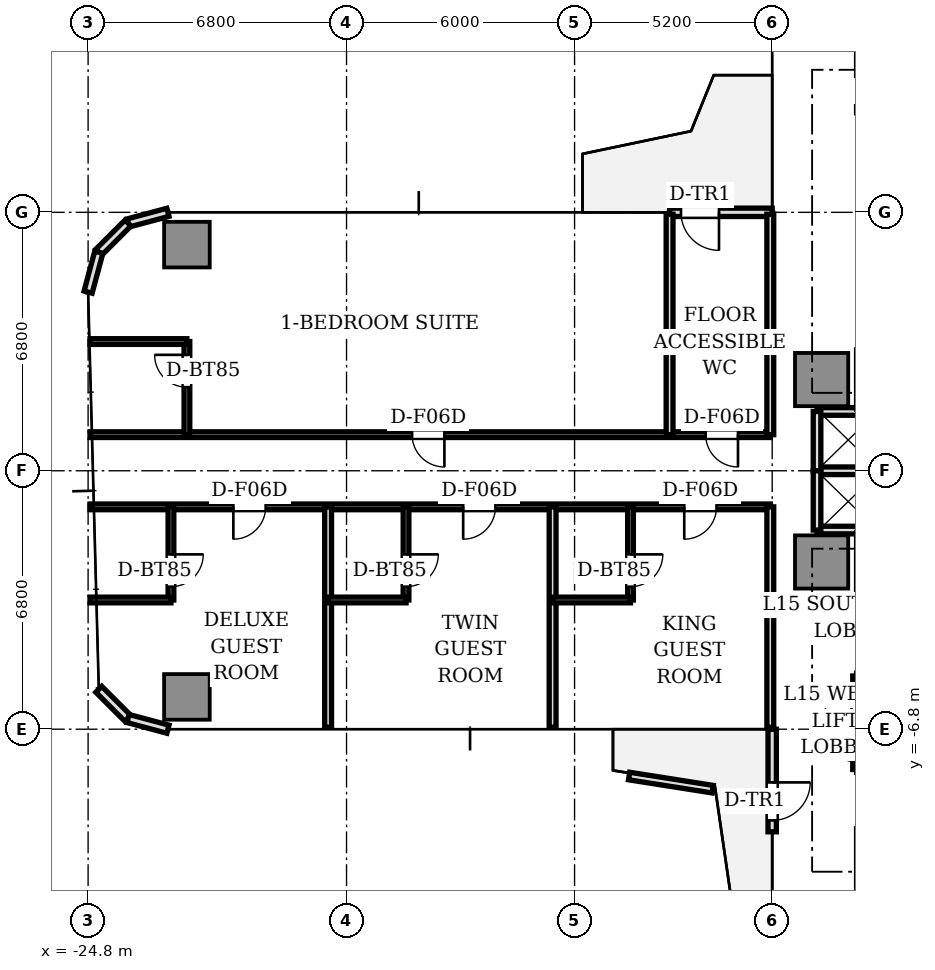
"""IFC4 building model, lengths in metres.
Left out: names, types, materials, properties, quantities, classifications, styles, units other than length and angle.
Written with IfcOpenShell. Run it as: python <this file> out.ifc"""

import sys

from ifc_helpers import new_model, si_unit, direction, frame, frame_2d, origin, origin_2d, place, context, subcontext, project, spatial, rectangle, extrude, source, transform, mapped, element, fill, save


model = new_model("IFC4")
c1 = context("Model", 3, precision=1e-05, world=origin(), true_north=direction((0.0, 1.0)))
c2 = subcontext(c1, "Body", "Model", "MODEL_VIEW")
j1 = project(units=[si_unit("LENGTHUNIT", "METRE"), si_unit("PLANEANGLEUNIT", "RADIAN")], contexts=[c1])
p1 = place(None, origin())
s1 = spatial("IfcSite", under=j1, at=p1, CompositionType="ELEMENT")
p2 = place(p1, origin())
s2 = spatial("IfcBuilding", under=s1, at=p2, CompositionType="ELEMENT")
p3 = place(p2, frame((0.0, 0.0, 57.75)))
s3 = spatial("IfcBuildingStorey", under=s2, at=p3, CompositionType="ELEMENT", Elevation=57.75)
m1 = source(origin(), c2, "Body", "SweptSolid", [
    extrude(rectangle(XDim=1.4, YDim=1.4, at=origin_2d()), origin(), (0.0, 0.0, 1.0), 3.11),
])
for number, where, z_axis, x_axis in (
    (1, (-5.5, 2.4, 0.0), (0.0, 0.0, 1.0), (1.0, 0.0, 0.0)),
    (2, (-5.5, -2.4, 0.0), (0.0, 0.0, 1.0), (1.0, 0.0, 0.0)),
):
    element("IfcColumn", number, at=place(p3, frame(where, z_axis=z_axis, x_axis=x_axis)), inside=s3, PredefinedType="COLUMN", context=c2, shape_type="MappedRepresentation", body=[
        mapped(m1, transform((0.0, 0.0, 0.0), scale=1.0)),
    ])
m2 = source(origin(), c2, "Body", "SweptSolid", [
    extrude(rectangle(XDim=1.2, YDim=1.2, at=origin_2d()), origin(), (0.0, 0.0, 1.0), 3.11),
])
for number, where, z_axis, x_axis in (
    (3, (-22.2, 5.95, 0.0), (0.0, 0.0, 1.0), (1.0, 0.0, 0.0)),
    (4, (-22.2, -5.95, 0.0), (0.0, 0.0, 1.0), (1.0, 0.0, 0.0)),
):
    element("IfcColumn", number, at=place(p3, frame(where, z_axis=z_axis, x_axis=x_axis)), inside=s3, PredefinedType="COLUMN", context=c2, shape_type="MappedRepresentation", body=[
        mapped(m2, transform((0.0, 0.0, 0.0), scale=1.0)),
    ])
p4 = place(p3, frame((-6.8, 6.8, 0.0), z_axis=(0.0, 0.0, 1.0), x_axis=(-1.0, 0.0, 0.0)))
e5 = element("IfcWall", 5, at=p4, inside=s3, PredefinedType="STANDARD", context=c2, shape_type="SweptSolid", body=[
    extrude(rectangle(XDim=2.7, YDim=0.22, at=frame_2d((1.35, 0.0))), origin(), (0.0, 0.0, 1.0), 3.11),
])
p5 = place(p4, frame((1.4, 0.0, 0.0)))
e6 = element("IfcOpeningElement", 6, at=p5, cuts=e5, PredefinedType="OPENING", context=c2, shape_type="SweptSolid", body=[
    extrude(rectangle(XDim=1.0, YDim=2.2, at=frame_2d((0.5, 1.1))), frame((0.0, 0.12, 0.0), z_axis=(0.0, -1.0, 0.0), x_axis=(1.0, 0.0, 0.0)), (0.0, 0.0, 1.0), 0.24),
])
for number, where, z_axis, x_axis in (
    (7, (-22.7, 6.8, 0.0), (0.0, 0.0, 1.0), (-0.966, -0.259, 0.0)),
    (8, (-23.75, 6.519, 0.0), (0.0, 0.0, 1.0), (-0.707, -0.707, 0.0)),
    (9, (-24.519, 5.75, 0.0), (0.0, 0.0, 1.0), (-0.259, -0.966, 0.0)),
    (10, (-24.519, -5.75, 0.0), (0.0, 0.0, 1.0), (0.707, -0.707, 0.0)),
    (11, (-23.75, -6.519, 0.0), (0.0, 0.0, 1.0), (0.966, -0.259, 0.0)),
):
    element("IfcWall", number, at=place(p3, frame(where, z_axis=z_axis, x_axis=x_axis)), inside=s3, PredefinedType="STANDARD", context=c2, shape_type="SweptSolid", body=[
        extrude(rectangle(XDim=1.087, YDim=0.22, at=frame_2d((0.543, 0.0))), origin(), (0.0, 0.0, 1.0), 3.11),
    ])
p6 = place(p3, frame((-6.8, -6.8, 0.0), z_axis=(0.0, 0.0, 1.0), x_axis=(0.0, -1.0, 0.0)))
e12 = element("IfcWall", 12, at=p6, inside=s3, PredefinedType="STANDARD", context=c2, shape_type="SweptSolid", body=[
    extrude(rectangle(XDim=2.7, YDim=0.22, at=frame_2d((1.35, 0.0))), origin(), (0.0, 0.0, 1.0), 3.11),
])
p7 = place(p6, frame((1.4, 0.0, 0.0)))
e13 = element("IfcOpeningElement", 13, at=p7, cuts=e12, PredefinedType="OPENING", context=c2, shape_type="SweptSolid", body=[
    extrude(rectangle(XDim=1.0, YDim=2.2, at=frame_2d((0.5, 1.1))), frame((0.0, 0.12, 0.0), z_axis=(0.0, -1.0, 0.0), x_axis=(1.0, 0.0, 0.0)), (0.0, 0.0, 1.0), 0.24),
])
p8 = place(p3, frame((-10.565, -8.032, 0.0), z_axis=(0.0, 0.0, 1.0), x_axis=(0.987843719012, -0.155450271175, 0.0)))
e14 = element("IfcWall", 14, at=p8, inside=s3, PredefinedType="PARAPET", context=c2, shape_type="SweptSolid", body=[
    extrude(rectangle(XDim=2.227, YDim=0.2, at=frame_2d((1.114, 0.0))), origin(), (0.0, 0.0, 1.0), 0.65),
])
for number, where, z_axis, x_axis in (
    (15, (-5.62, 1.56, 0.0), (0.0, 0.0, 1.0), (1.0, 0.0, 0.0)),
    (16, (-5.62, -1.56, 0.0), (0.0, 0.0, 1.0), (1.0, 0.0, 0.0)),
    (17, (-5.62, 0.0, 0.0), (0.0, 0.0, 1.0), (1.0, 0.0, 0.0)),
):
    element("IfcWall", number, at=place(p3, frame(where, z_axis=z_axis, x_axis=x_axis)), inside=s3, PredefinedType="SOLIDWALL", context=c2, shape_type="SweptSolid", body=[
        extrude(rectangle(XDim=1.64, YDim=0.2, at=frame_2d((0.82, 0.0))), origin(), (0.0, 0.0, 1.0), 2.66),
    ])
for number, where, z_axis, x_axis in (
    (18, (-5.62, 0.0, 0.0), (0.0, 0.0, 1.0), (0.0, 1.0, 0.0)),
    (19, (-5.62, -1.56, 0.0), (0.0, 0.0, 1.0), (0.0, 1.0, 0.0)),
):
    element("IfcWall", number, at=place(p3, frame(where, z_axis=z_axis, x_axis=x_axis)), inside=s3, PredefinedType="SOLIDWALL", context=c2, shape_type="SweptSolid", body=[
        extrude(rectangle(XDim=1.56, YDim=0.2, at=frame_2d((0.78, 0.0))), origin(), (0.0, 0.0, 1.0), 2.66),
    ])
p9 = place(p3, frame((-4.58, -7.86, 0.0), z_axis=(0.0, 0.0, 1.0), x_axis=(0.0, 1.0, 0.0)))
e20 = element("IfcWall", 20, at=p9, inside=s3, PredefinedType="SOLIDWALL", context=c2, shape_type="SweptSolid", body=[
    extrude(rectangle(XDim=2.46, YDim=0.2, at=frame_2d((1.23, 0.0))), origin(), (0.0, 0.0, 1.0), 2.66),
])
p10 = place(p9, frame((0.2, 0.0, 0.0)))
e21 = element("IfcOpeningElement", 21, at=p10, cuts=e20, PredefinedType="OPENING", context=c2, shape_type="SweptSolid", body=[
    extrude(rectangle(XDim=0.85, YDim=2.1, at=frame_2d((0.425, 1.05))), frame((0.0, 0.11, 0.0), z_axis=(0.0, -1.0, 0.0), x_axis=(1.0, 0.0, 0.0)), (0.0, 0.0, 1.0), 0.22),
])
p11 = place(p9, frame((1.38, 0.0, 0.0)))
e22 = element("IfcOpeningElement", 22, at=p11, cuts=e20, PredefinedType="OPENING", context=c2, shape_type="SweptSolid", body=[
    extrude(rectangle(XDim=0.85, YDim=2.1, at=frame_2d((0.425, 1.05))), frame((0.0, 0.11, 0.0), z_axis=(0.0, -1.0, 0.0), x_axis=(1.0, 0.0, 0.0)), (0.0, 0.0, 1.0), 0.22),
])
p12 = place(p3, frame((-6.85, -0.95, 0.0), z_axis=(0.0, 0.0, 1.0), x_axis=(-1.0, 0.0, 0.0)))
e23 = element("IfcWall", 23, at=p12, inside=s3, PredefinedType="PARTITIONING", context=c2, shape_type="SweptSolid", body=[
    extrude(rectangle(XDim=17.9, YDim=0.15, at=frame_2d((8.95, 0.0))), origin(), (0.0, 0.0, 1.0), 2.66),
])
p13 = place(p12, frame((1.414, 0.0, 0.0)))
e24 = element("IfcOpeningElement", 24, at=p13, cuts=e23, PredefinedType="OPENING", context=c2, shape_type="SweptSolid", body=[
    extrude(rectangle(XDim=0.85, YDim=2.1, at=frame_2d((0.425, 1.05))), frame((0.0, 0.085, 0.0), z_axis=(0.0, -1.0, 0.0), x_axis=(1.0, 0.0, 0.0)), (0.0, 0.0, 1.0), 0.17),
])
p14 = place(p12, frame((7.231, 0.0, 0.0)))
e25 = element("IfcOpeningElement", 25, at=p14, cuts=e23, PredefinedType="OPENING", context=c2, shape_type="SweptSolid", body=[
    extrude(rectangle(XDim=0.85, YDim=2.1, at=frame_2d((0.425, 1.05))), frame((0.0, 0.085, 0.0), z_axis=(0.0, -1.0, 0.0), x_axis=(1.0, 0.0, 0.0)), (0.0, 0.0, 1.0), 0.17),
])
p15 = place(p12, frame((13.278, 0.0, 0.0)))
e26 = element("IfcOpeningElement", 26, at=p15, cuts=e23, PredefinedType="OPENING", context=c2, shape_type="SweptSolid", body=[
    extrude(rectangle(XDim=0.85, YDim=2.1, at=frame_2d((0.425, 1.05))), frame((0.0, 0.085, 0.0), z_axis=(0.0, -1.0, 0.0), x_axis=(1.0, 0.0, 0.0)), (0.0, 0.0, 1.0), 0.17),
])
p16 = place(p3, frame((-6.85, 0.95, 0.0), z_axis=(0.0, 0.0, 1.0), x_axis=(-1.0, 0.0, 0.0)))
e27 = element("IfcWall", 27, at=p16, inside=s3, PredefinedType="PARTITIONING", context=c2, shape_type="SweptSolid", body=[
    extrude(rectangle(XDim=17.9, YDim=0.15, at=frame_2d((8.95, 0.0))), origin(), (0.0, 0.0, 1.0), 2.66),
])
p17 = place(p16, frame((0.85, 0.0, 0.0)))
e28 = element("IfcOpeningElement", 28, at=p17, cuts=e27, PredefinedType="OPENING", context=c2, shape_type="SweptSolid", body=[
    extrude(rectangle(XDim=0.85, YDim=2.1, at=frame_2d((0.425, 1.05))), frame((0.0, 0.085, 0.0), z_axis=(0.0, -1.0, 0.0), x_axis=(1.0, 0.0, 0.0)), (0.0, 0.0, 1.0), 0.17),
])
p18 = place(p16, frame((8.575, 0.0, 0.0)))
e29 = element("IfcOpeningElement", 29, at=p18, cuts=e27, PredefinedType="OPENING", context=c2, shape_type="SweptSolid", body=[
    extrude(rectangle(XDim=0.85, YDim=2.1, at=frame_2d((0.425, 1.05))), frame((0.0, 0.085, 0.0), z_axis=(0.0, -1.0, 0.0), x_axis=(1.0, 0.0, 0.0)), (0.0, 0.0, 1.0), 0.17),
])
for number, where, z_axis, x_axis in (
    (30, (-6.85, -0.95, 0.0), (0.0, 0.0, 1.0), (0.0, -1.0, 0.0)),
    (31, (-6.85, 6.75, 0.0), (0.0, 0.0, 1.0), (0.0, -1.0, 0.0)),
    (32, (-12.578, -0.95, 0.0), (0.0, 0.0, 1.0), (0.0, -1.0, 0.0)),
):
    element("IfcWall", number, at=place(p3, frame(where, z_axis=z_axis, x_axis=x_axis)), inside=s3, PredefinedType="PARTITIONING", context=c2, shape_type="SweptSolid", body=[
        extrude(rectangle(XDim=5.8, YDim=0.18, at=frame_2d((2.9, 0.0))), origin(), (0.0, 0.0, 1.0), 2.66),
    ])
p19 = place(p3, frame((-10.528, -0.95, 0.0), z_axis=(0.0, 0.0, 1.0), x_axis=(0.0, -1.0, 0.0)))
e33 = element("IfcWall", 33, at=p19, inside=s3, PredefinedType="PARTITIONING", context=c2, shape_type="SweptSolid", body=[
    extrude(rectangle(XDim=2.45, YDim=0.15, at=frame_2d((1.225, 0.0))), origin(), (0.0, 0.0, 1.0), 2.66),
])
p20 = place(p19, frame((1.25, 0.0, 0.0)))
e34 = element("IfcOpeningElement", 34, at=p20, cuts=e33, PredefinedType="OPENING", context=c2, shape_type="SweptSolid", body=[
    extrude(rectangle(XDim=0.85, YDim=2.1, at=frame_2d((0.425, 1.05))), frame((0.0, 0.085, 0.0), z_axis=(0.0, -1.0, 0.0), x_axis=(1.0, 0.0, 0.0)), (0.0, 0.0, 1.0), 0.17),
])
p21 = place(p3, frame((-10.528, -3.4, 0.0), z_axis=(0.0, 0.0, 1.0), x_axis=(-1.0, 0.0, 0.0)))
e35 = element("IfcWall", 35, at=p21, inside=s3, PredefinedType="PARTITIONING", context=c2, shape_type="SweptSolid", body=[
    extrude(rectangle(XDim=2.05, YDim=0.15, at=frame_2d((1.025, 0.0))), origin(), (0.0, 0.0, 1.0), 2.63),
])
p22 = place(p3, frame((-18.485, -0.95, 0.0), z_axis=(0.0, 0.0, 1.0), x_axis=(0.0, -1.0, 0.0)))
e36 = element("IfcWall", 36, at=p22, inside=s3, PredefinedType="PARTITIONING", context=c2, shape_type="SweptSolid", body=[
    extrude(rectangle(XDim=5.8, YDim=0.18, at=frame_2d((2.9, 0.0))), origin(), (0.0, 0.0, 1.0), 2.66),
])
p23 = place(p3, frame((-16.435, -0.95, 0.0), z_axis=(0.0, 0.0, 1.0), x_axis=(0.0, -1.0, 0.0)))
e37 = element("IfcWall", 37, at=p23, inside=s3, PredefinedType="PARTITIONING", context=c2, shape_type="SweptSolid", body=[
    extrude(rectangle(XDim=2.45, YDim=0.15, at=frame_2d((1.225, 0.0))), origin(), (0.0, 0.0, 1.0), 2.66),
])
p24 = place(p23, frame((1.25, 0.0, 0.0)))
e38 = element("IfcOpeningElement", 38, at=p24, cuts=e37, PredefinedType="OPENING", context=c2, shape_type="SweptSolid", body=[
    extrude(rectangle(XDim=0.85, YDim=2.1, at=frame_2d((0.425, 1.05))), frame((0.0, 0.085, 0.0), z_axis=(0.0, -1.0, 0.0), x_axis=(1.0, 0.0, 0.0)), (0.0, 0.0, 1.0), 0.17),
])
p25 = place(p3, frame((-16.435, -3.4, 0.0), z_axis=(0.0, 0.0, 1.0), x_axis=(-1.0, 0.0, 0.0)))
e39 = element("IfcWall", 39, at=p25, inside=s3, PredefinedType="PARTITIONING", context=c2, shape_type="SweptSolid", body=[
    extrude(rectangle(XDim=2.05, YDim=0.15, at=frame_2d((1.025, 0.0))), origin(), (0.0, 0.0, 1.0), 2.63),
])
p26 = place(p3, frame((-22.62, -0.95, 0.0), z_axis=(0.0, 0.0, 1.0), x_axis=(0.0, -1.0, 0.0)))
e40 = element("IfcWall", 40, at=p26, inside=s3, PredefinedType="PARTITIONING", context=c2, shape_type="SweptSolid", body=[
    extrude(rectangle(XDim=2.45, YDim=0.15, at=frame_2d((1.225, 0.0))), origin(), (0.0, 0.0, 1.0), 2.66),
])
p27 = place(p26, frame((1.25, 0.0, 0.0)))
e41 = element("IfcOpeningElement", 41, at=p27, cuts=e40, PredefinedType="OPENING", context=c2, shape_type="SweptSolid", body=[
    extrude(rectangle(XDim=0.85, YDim=2.1, at=frame_2d((0.425, 1.05))), frame((0.0, 0.085, 0.0), z_axis=(0.0, -1.0, 0.0), x_axis=(1.0, 0.0, 0.0)), (0.0, 0.0, 1.0), 0.17),
])
p28 = place(p3, frame((-22.62, -3.4, 0.0), z_axis=(0.0, 0.0, 1.0), x_axis=(-1.0, 0.0, 0.0)))
e42 = element("IfcWall", 42, at=p28, inside=s3, PredefinedType="PARTITIONING", context=c2, shape_type="SweptSolid", body=[
    extrude(rectangle(XDim=2.13, YDim=0.15, at=frame_2d((1.065, 0.0))), origin(), (0.0, 0.0, 1.0), 2.66),
])
p29 = place(p3, frame((-9.5, 0.95, 0.0), z_axis=(0.0, 0.0, 1.0), x_axis=(0.0, 1.0, 0.0)))
e43 = element("IfcWall", 43, at=p29, inside=s3, PredefinedType="PARTITIONING", context=c2, shape_type="SweptSolid", body=[
    extrude(rectangle(XDim=5.8, YDim=0.18, at=frame_2d((2.9, 0.0))), origin(), (0.0, 0.0, 1.0), 2.66),
])
p30 = place(p3, frame((-22.2, 0.95, 0.0), z_axis=(0.0, 0.0, 1.0), x_axis=(0.0, 1.0, 0.0)))
e44 = element("IfcWall", 44, at=p30, inside=s3, PredefinedType="PARTITIONING", context=c2, shape_type="SweptSolid", body=[
    extrude(rectangle(XDim=2.45, YDim=0.15, at=frame_2d((1.225, 0.0))), origin(), (0.0, 0.0, 1.0), 2.58),
])
p31 = place(p30, frame((1.25, 0.0, 0.0)))
e45 = element("IfcOpeningElement", 45, at=p31, cuts=e44, PredefinedType="OPENING", context=c2, shape_type="SweptSolid", body=[
    extrude(rectangle(XDim=0.85, YDim=2.1, at=frame_2d((0.425, 1.05))), frame((0.0, 0.085, 0.0), z_axis=(0.0, -1.0, 0.0), x_axis=(1.0, 0.0, 0.0)), (0.0, 0.0, 1.0), 0.17),
])
p32 = place(p3, frame((-22.2, 3.4, 0.0), z_axis=(0.0, 0.0, 1.0), x_axis=(-1.0, 0.0, 0.0)))
e46 = element("IfcWall", 46, at=p32, inside=s3, PredefinedType="PARTITIONING", context=c2, shape_type="SweptSolid", body=[
    extrude(rectangle(XDim=2.55, YDim=0.15, at=frame_2d((1.275, 0.0))), origin(), (0.0, 0.0, 1.0), 2.66),
])
m3 = source(origin(), c2, "Body", "SweptSolid", [
    extrude(rectangle(XDim=1.0, YDim=0.05, at=origin_2d()), origin(), (0.0, 0.0, 1.0), 2.2),
])
p33 = place(p5, frame((0.5, 0.0, 0.0)))
e47 = element("IfcDoor", 47, at=p33, inside=s3, OperationType="SINGLE_SWING_LEFT", PredefinedType="DOOR", context=c2, shape_type="MappedRepresentation", body=[
    mapped(m3, transform((0.0, 0.0, 0.0), scale=1.0)),
])
fill(e6, e47)
p34 = place(p7, frame((0.5, 0.0, 0.0)))
e48 = element("IfcDoor", 48, at=p34, inside=s3, OperationType="SINGLE_SWING_LEFT", PredefinedType="DOOR", context=c2, shape_type="MappedRepresentation", body=[
    mapped(m3, transform((0.0, 0.0, 0.0), scale=1.0)),
])
fill(e13, e48)
m4 = source(origin(), c2, "Body", "SweptSolid", [
    extrude(rectangle(XDim=0.85, YDim=0.05, at=origin_2d()), origin(), (0.0, 0.0, 1.0), 2.1),
])
p35 = place(p20, frame((0.425, 0.0, 0.0)))
e49 = element("IfcDoor", 49, at=p35, inside=s3, OperationType="SINGLE_SWING_LEFT", PredefinedType="DOOR", context=c2, shape_type="MappedRepresentation", body=[
    mapped(m4, transform((0.0, 0.0, 0.0), scale=1.0)),
])
fill(e34, e49)
p36 = place(p13, frame((0.425, 0.0, 0.0)))
e50 = element("IfcDoor", 50, at=p36, inside=s3, OperationType="SINGLE_SWING_RIGHT", PredefinedType="DOOR", context=c2, shape_type="MappedRepresentation", body=[
    mapped(m4, transform((0.0, 0.0, 0.0), scale=1.0)),
])
fill(e24, e50)
p37 = place(p24, frame((0.425, 0.0, 0.0)))
e51 = element("IfcDoor", 51, at=p37, inside=s3, OperationType="SINGLE_SWING_LEFT", PredefinedType="DOOR", context=c2, shape_type="MappedRepresentation", body=[
    mapped(m4, transform((0.0, 0.0, 0.0), scale=1.0)),
])
fill(e38, e51)
p38 = place(p14, frame((0.425, 0.0, 0.0)))
e52 = element("IfcDoor", 52, at=p38, inside=s3, OperationType="SINGLE_SWING_RIGHT", PredefinedType="DOOR", context=c2, shape_type="MappedRepresentation", body=[
    mapped(m4, transform((0.0, 0.0, 0.0), scale=1.0)),
])
fill(e25, e52)
p39 = place(p27, frame((0.425, 0.0, 0.0)))
e53 = element("IfcDoor", 53, at=p39, inside=s3, OperationType="SINGLE_SWING_LEFT", PredefinedType="DOOR", context=c2, shape_type="MappedRepresentation", body=[
    mapped(m4, transform((0.0, 0.0, 0.0), scale=1.0)),
])
fill(e41, e53)
p40 = place(p15, frame((0.425, 0.0, 0.0)))
e54 = element("IfcDoor", 54, at=p40, inside=s3, OperationType="SINGLE_SWING_RIGHT", PredefinedType="DOOR", context=c2, shape_type="MappedRepresentation", body=[
    mapped(m4, transform((0.0, 0.0, 0.0), scale=1.0)),
])
fill(e26, e54)
p41 = place(p17, frame((0.425, 0.0, 0.0)))
e55 = element("IfcDoor", 55, at=p41, inside=s3, OperationType="SINGLE_SWING_LEFT", PredefinedType="DOOR", context=c2, shape_type="MappedRepresentation", body=[
    mapped(m4, transform((0.0, 0.0, 0.0), scale=1.0)),
])
fill(e28, e55)
p42 = place(p31, frame((0.425, 0.0, 0.0)))
e56 = element("IfcDoor", 56, at=p42, inside=s3, OperationType="SINGLE_SWING_RIGHT", PredefinedType="DOOR", context=c2, shape_type="MappedRepresentation", body=[
    mapped(m4, transform((0.0, 0.0, 0.0), scale=1.0)),
])
fill(e45, e56)
p43 = place(p18, frame((0.425, 0.0, 0.0)))
e57 = element("IfcDoor", 57, at=p43, inside=s3, OperationType="SINGLE_SWING_LEFT", PredefinedType="DOOR", context=c2, shape_type="MappedRepresentation", body=[
    mapped(m4, transform((0.0, 0.0, 0.0), scale=1.0)),
])
fill(e29, e57)
save(model, sys.argv[1])
